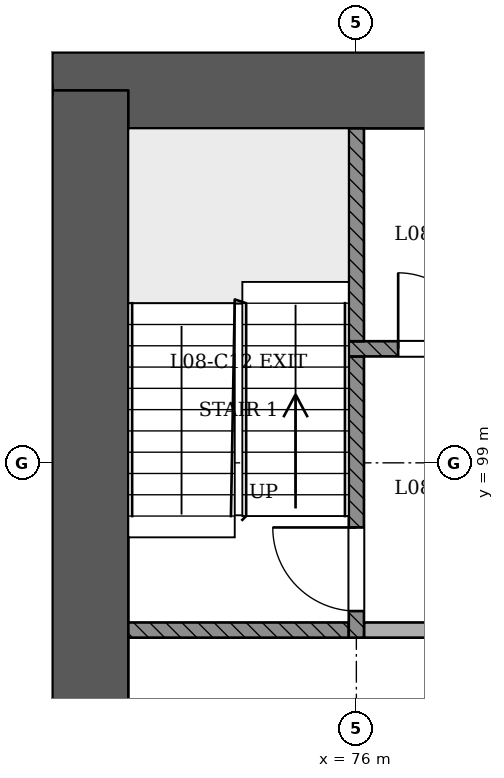
"""IFC4 building model, lengths in metres.
Left out: names, types, materials, properties, quantities, classifications, styles, units other than length and angle.
Written with IfcOpenShell. Run it as: python <this file> out.ifc"""

import sys

from ifc_helpers import new_model, si_unit, direction, frame, frame_2d, origin, place, context, subcontext, project, spatial, rectangle, extrude, element, fill, save


model = new_model("IFC4")
c1 = context("Model", 3, precision=1e-05, world=origin(), true_north=direction((0.0, 1.0)))
c2 = subcontext(c1, "Body", "Model", "MODEL_VIEW")
j1 = project(units=[si_unit("LENGTHUNIT", "METRE"), si_unit("PLANEANGLEUNIT", "RADIAN")], contexts=[c1])
p1 = place(None, origin())
s1 = spatial("IfcSite", under=j1, at=p1, CompositionType="ELEMENT")
p2 = place(p1, origin())
s2 = spatial("IfcBuilding", under=s1, at=p2, CompositionType="ELEMENT")
p3 = place(p2, frame((0.0, 0.0, 37.8)))
s3 = spatial("IfcBuildingStorey", under=s2, at=p3, CompositionType="ELEMENT", Elevation=37.8)
p4 = place(p3, frame((97.5, 103.9, 0.0), z_axis=(0.0, 0.0, 1.0), x_axis=(-1.0, 0.0, 0.0)))
e1 = element("IfcWall", 1, at=p4, inside=s3, PredefinedType="SHEAR", context=c2, shape_type="SweptSolid", body=[
    extrude(rectangle(XDim=25.5, YDim=1.0, at=frame_2d((12.75, 0.0))), origin(), (0.0, 0.0, 1.0), 3.6),
])
p5 = place(p3, frame((72.5, 103.9, 0.0), z_axis=(0.0, 0.0, 1.0), x_axis=(0.0, -1.0, 0.0)))
e2 = element("IfcWall", 2, at=p5, inside=s3, PredefinedType="SHEAR", context=c2, shape_type="SweptSolid", body=[
    extrude(rectangle(XDim=11.5, YDim=1.0, at=frame_2d((5.75, 0.0))), origin(), (0.0, 0.0, 1.0), 3.6),
])
p6 = place(p3, frame((61.497, 96.54, 0.0), z_axis=(0.0, 0.0, 1.0), x_axis=(0.499995935097, -0.866027750645, 0.0)))
e3 = element("IfcWall", 3, at=p6, inside=s3, PredefinedType="PARTITIONING", context=c2, shape_type="SweptSolid", body=[
    extrude(rectangle(XDim=44.742, YDim=0.15, at=frame_2d((22.371, 0.0))), origin(), (0.0, 0.0, 1.0), 2.7),
])
p7 = place(p6, frame((1.84, 0.0, 0.0)))
e4 = element("IfcOpeningElement", 4, at=p7, cuts=e3, PredefinedType="OPENING", context=c2, shape_type="SweptSolid", body=[
    extrude(rectangle(XDim=1.0, YDim=2.1, at=frame_2d((0.5, 1.05))), frame((0.0, 0.085, 0.0), z_axis=(0.0, -1.0, 0.0), x_axis=(1.0, 0.0, 0.0)), (0.0, 0.0, 1.0), 0.171),
])
p8 = place(p6, frame((4.942, 0.0, 0.0)))
e5 = element("IfcOpeningElement", 5, at=p8, cuts=e3, PredefinedType="OPENING", context=c2, shape_type="SweptSolid", body=[
    extrude(rectangle(XDim=1.1, YDim=2.1, at=frame_2d((0.55, 1.05))), frame((0.0, 0.085, 0.0), z_axis=(0.0, -1.0, 0.0), x_axis=(1.0, 0.0, 0.0)), (0.0, 0.0, 1.0), 0.171),
])
p9 = place(p6, frame((11.651, 0.0, 0.0)))
e6 = element("IfcOpeningElement", 6, at=p9, cuts=e3, PredefinedType="OPENING", context=c2, shape_type="SweptSolid", body=[
    extrude(rectangle(XDim=1.0, YDim=2.1, at=frame_2d((0.5, 1.05))), frame((0.0, 0.085, 0.0), z_axis=(0.0, -1.0, 0.0), x_axis=(1.0, 0.0, 0.0)), (0.0, 0.0, 1.0), 0.171),
])
p10 = place(p6, frame((18.371, 0.0, 0.0)))
e7 = element("IfcOpeningElement", 7, at=p10, cuts=e3, PredefinedType="OPENING", context=c2, shape_type="SweptSolid", body=[
    extrude(rectangle(XDim=1.2, YDim=2.1, at=frame_2d((0.6, 1.05))), frame((0.0, 0.085, 0.0), z_axis=(0.0, -1.0, 0.0), x_axis=(1.0, 0.0, 0.0)), (0.0, 0.0, 1.0), 0.171),
])
p11 = place(p6, frame((23.092, 0.0, 0.0)))
e8 = element("IfcOpeningElement", 8, at=p11, cuts=e3, PredefinedType="OPENING", context=c2, shape_type="SweptSolid", body=[
    extrude(rectangle(XDim=1.0, YDim=2.1, at=frame_2d((0.5, 1.05))), frame((0.0, 0.085, 0.0), z_axis=(0.0, -1.0, 0.0), x_axis=(1.0, 0.0, 0.0)), (0.0, 0.0, 1.0), 0.171),
])
p12 = place(p6, frame((29.767, 0.0, 0.0)))
e9 = element("IfcOpeningElement", 9, at=p12, cuts=e3, PredefinedType="OPENING", context=c2, shape_type="SweptSolid", body=[
    extrude(rectangle(XDim=1.0, YDim=2.1, at=frame_2d((0.5, 1.05))), frame((0.0, 0.085, 0.0), z_axis=(0.0, -1.0, 0.0), x_axis=(1.0, 0.0, 0.0)), (0.0, 0.0, 1.0), 0.171),
])
p13 = place(p6, frame((31.976, 0.0, 0.0)))
e10 = element("IfcOpeningElement", 10, at=p13, cuts=e3, PredefinedType="OPENING", context=c2, shape_type="SweptSolid", body=[
    extrude(rectangle(XDim=1.0, YDim=2.1, at=frame_2d((0.5, 1.05))), frame((0.0, 0.085, 0.0), z_axis=(0.0, -1.0, 0.0), x_axis=(1.0, 0.0, 0.0)), (0.0, 0.0, 1.0), 0.171),
])
p14 = place(p6, frame((38.767, 0.0, 0.0)))
e11 = element("IfcOpeningElement", 11, at=p14, cuts=e3, PredefinedType="OPENING", context=c2, shape_type="SweptSolid", body=[
    extrude(rectangle(XDim=1.0, YDim=2.1, at=frame_2d((0.5, 1.05))), frame((0.0, 0.085, 0.0), z_axis=(0.0, -1.0, 0.0), x_axis=(1.0, 0.0, 0.0)), (0.0, 0.0, 1.0), 0.171),
])
p15 = place(p6, frame((40.707, 0.0, 0.0)))
e12 = element("IfcOpeningElement", 12, at=p15, cuts=e3, PredefinedType="OPENING", context=c2, shape_type="SweptSolid", body=[
    extrude(rectangle(XDim=1.0, YDim=2.1, at=frame_2d((0.5, 1.05))), frame((0.0, 0.085, 0.0), z_axis=(0.0, -1.0, 0.0), x_axis=(1.0, 0.0, 0.0)), (0.0, 0.0, 1.0), 0.171),
])
p16 = place(p3, frame((73.0, 96.8, 0.0), z_axis=(0.0, 0.0, 1.0), x_axis=(1.0, 0.0, 0.0)))
e13 = element("IfcWall", 13, at=p16, inside=s3, PredefinedType="SOLIDWALL", context=c2, shape_type="SweptSolid", body=[
    extrude(rectangle(XDim=2.9, YDim=0.2, at=frame_2d((1.45, 0.0))), origin(), (0.0, 0.0, 1.0), 3.1),
])
p17 = place(p3, frame((76.0, 96.7, 0.0), z_axis=(0.0, 0.0, 1.0), x_axis=(0.0, 1.0, 0.0)))
e14 = element("IfcWall", 14, at=p17, inside=s3, PredefinedType="SOLIDWALL", context=c2, shape_type="SweptSolid", body=[
    extrude(rectangle(XDim=3.7, YDim=0.2, at=frame_2d((1.85, 0.0))), origin(), (0.0, 0.0, 1.0), 3.1),
])
p18 = place(p17, frame((0.35, 0.0, 0.0)))
e15 = element("IfcOpeningElement", 15, at=p18, cuts=e14, PredefinedType="OPENING", context=c2, shape_type="SweptSolid", body=[
    extrude(rectangle(XDim=1.1, YDim=2.1, at=frame_2d((0.55, 1.05))), frame((0.0, 0.11, 0.0), z_axis=(0.0, -1.0, 0.0), x_axis=(1.0, 0.0, 0.0)), (0.0, 0.0, 1.0), 0.221),
])
p19 = place(p3, frame((76.1, 96.8, 0.0), z_axis=(0.0, 0.0, 1.0), x_axis=(1.0, 0.0, 0.0)))
e16 = element("IfcWall", 16, at=p19, inside=s3, PredefinedType="PARTITIONING", context=c2, shape_type="SweptSolid", body=[
    extrude(rectangle(XDim=1.9, YDim=0.2, at=frame_2d((0.95, 0.0))), origin(), (0.0, 0.0, 1.0), 3.1),
])
p20 = place(p3, frame((75.9, 100.5, 0.0), z_axis=(0.0, 0.0, 1.0), x_axis=(1.0, 0.0, 0.0)))
e17 = element("IfcWall", 17, at=p20, inside=s3, PredefinedType="SOLIDWALL", context=c2, shape_type="SweptSolid", body=[
    extrude(rectangle(XDim=18.2, YDim=0.2, at=frame_2d((9.1, 0.0))), origin(), (0.0, 0.0, 1.0), 3.1),
])
p21 = place(p20, frame((2.6, 0.0, 0.0)))
e18 = element("IfcOpeningElement", 18, at=p21, cuts=e17, PredefinedType="OPENING", context=c2, shape_type="SweptSolid", body=[
    extrude(rectangle(XDim=1.1, YDim=2.1, at=frame_2d((0.55, 1.05))), frame((0.0, 0.11, 0.0), z_axis=(0.0, -1.0, 0.0), x_axis=(1.0, 0.0, 0.0)), (0.0, 0.0, 1.0), 0.221),
])
p22 = place(p20, frame((4.5, 0.0, 0.0)))
e19 = element("IfcOpeningElement", 19, at=p22, cuts=e17, PredefinedType="OPENING", context=c2, shape_type="SweptSolid", body=[
    extrude(rectangle(XDim=1.1, YDim=2.1, at=frame_2d((0.55, 1.05))), frame((0.0, 0.11, 0.0), z_axis=(0.0, -1.0, 0.0), x_axis=(1.0, 0.0, 0.0)), (0.0, 0.0, 1.0), 0.221),
])
p23 = place(p20, frame((6.4, 0.0, 0.0)))
e20 = element("IfcOpeningElement", 20, at=p23, cuts=e17, PredefinedType="OPENING", context=c2, shape_type="SweptSolid", body=[
    extrude(rectangle(XDim=1.1, YDim=2.1, at=frame_2d((0.55, 1.05))), frame((0.0, 0.11, 0.0), z_axis=(0.0, -1.0, 0.0), x_axis=(1.0, 0.0, 0.0)), (0.0, 0.0, 1.0), 0.221),
])
p24 = place(p20, frame((8.3, 0.0, 0.0)))
e21 = element("IfcOpeningElement", 21, at=p24, cuts=e17, PredefinedType="OPENING", context=c2, shape_type="SweptSolid", body=[
    extrude(rectangle(XDim=1.1, YDim=2.1, at=frame_2d((0.55, 1.05))), frame((0.0, 0.11, 0.0), z_axis=(0.0, -1.0, 0.0), x_axis=(1.0, 0.0, 0.0)), (0.0, 0.0, 1.0), 0.221),
])
p25 = place(p20, frame((10.2, 0.0, 0.0)))
e22 = element("IfcOpeningElement", 22, at=p25, cuts=e17, PredefinedType="OPENING", context=c2, shape_type="SweptSolid", body=[
    extrude(rectangle(XDim=1.1, YDim=2.1, at=frame_2d((0.55, 1.05))), frame((0.0, 0.11, 0.0), z_axis=(0.0, -1.0, 0.0), x_axis=(1.0, 0.0, 0.0)), (0.0, 0.0, 1.0), 0.221),
])
p26 = place(p20, frame((12.1, 0.0, 0.0)))
e23 = element("IfcOpeningElement", 23, at=p26, cuts=e17, PredefinedType="OPENING", context=c2, shape_type="SweptSolid", body=[
    extrude(rectangle(XDim=1.1, YDim=2.1, at=frame_2d((0.55, 1.05))), frame((0.0, 0.11, 0.0), z_axis=(0.0, -1.0, 0.0), x_axis=(1.0, 0.0, 0.0)), (0.0, 0.0, 1.0), 0.221),
])
p27 = place(p20, frame((14.0, 0.0, 0.0)))
e24 = element("IfcOpeningElement", 24, at=p27, cuts=e17, PredefinedType="OPENING", context=c2, shape_type="SweptSolid", body=[
    extrude(rectangle(XDim=1.1, YDim=2.1, at=frame_2d((0.55, 1.05))), frame((0.0, 0.11, 0.0), z_axis=(0.0, -1.0, 0.0), x_axis=(1.0, 0.0, 0.0)), (0.0, 0.0, 1.0), 0.221),
])
p28 = place(p20, frame((0.65, 0.0, 0.0)))
e25 = element("IfcOpeningElement", 25, at=p28, cuts=e17, PredefinedType="OPENING", context=c2, shape_type="SweptSolid", body=[
    extrude(rectangle(XDim=1.0, YDim=2.1, at=frame_2d((0.5, 1.05))), frame((0.0, 0.11, 0.0), z_axis=(0.0, -1.0, 0.0), x_axis=(1.0, 0.0, 0.0)), (0.0, 0.0, 1.0), 0.221),
])
p29 = place(p20, frame((16.3, 0.0, 0.0)))
e26 = element("IfcOpeningElement", 26, at=p29, cuts=e17, PredefinedType="OPENING", context=c2, shape_type="SweptSolid", body=[
    extrude(rectangle(XDim=1.0, YDim=2.1, at=frame_2d((0.5, 1.05))), frame((0.0, 0.11, 0.0), z_axis=(0.0, -1.0, 0.0), x_axis=(1.0, 0.0, 0.0)), (0.0, 0.0, 1.0), 0.221),
])
p30 = place(p3, frame((76.0, 100.6, 0.0), z_axis=(0.0, 0.0, 1.0), x_axis=(0.0, 1.0, 0.0)))
e27 = element("IfcWall", 27, at=p30, inside=s3, PredefinedType="SOLIDWALL", context=c2, shape_type="SweptSolid", body=[
    extrude(rectangle(XDim=2.8, YDim=0.2, at=frame_2d((1.4, 0.0))), origin(), (0.0, 0.0, 1.0), 3.1),
])
p31 = place(p18, origin())
e28 = element("IfcDoor", 28, at=p31, inside=s3, OperationType="SINGLE_SWING_RIGHT", PredefinedType="NOTDEFINED", context=c2, shape_type="SweptSolid", body=[
    extrude(rectangle(XDim=1.1, YDim=2.1, at=frame_2d((0.55, 1.05))), frame((0.0, 0.025, 0.0), z_axis=(0.0, -1.0, 0.0), x_axis=(1.0, 0.0, 0.0)), (0.0, 0.0, 1.0), 0.05),
])
fill(e15, e28)
p32 = place(p28, origin())
e29 = element("IfcDoor", 29, at=p32, inside=s3, OperationType="SINGLE_SWING_LEFT", PredefinedType="NOTDEFINED", context=c2, shape_type="SweptSolid", body=[
    extrude(rectangle(XDim=1.0, YDim=2.1, at=frame_2d((0.5, 1.05))), frame((0.0, 0.025, 0.0), z_axis=(0.0, -1.0, 0.0), x_axis=(1.0, 0.0, 0.0)), (0.0, 0.0, 1.0), 0.05),
])
fill(e25, e29)
save(model, sys.argv[1])
